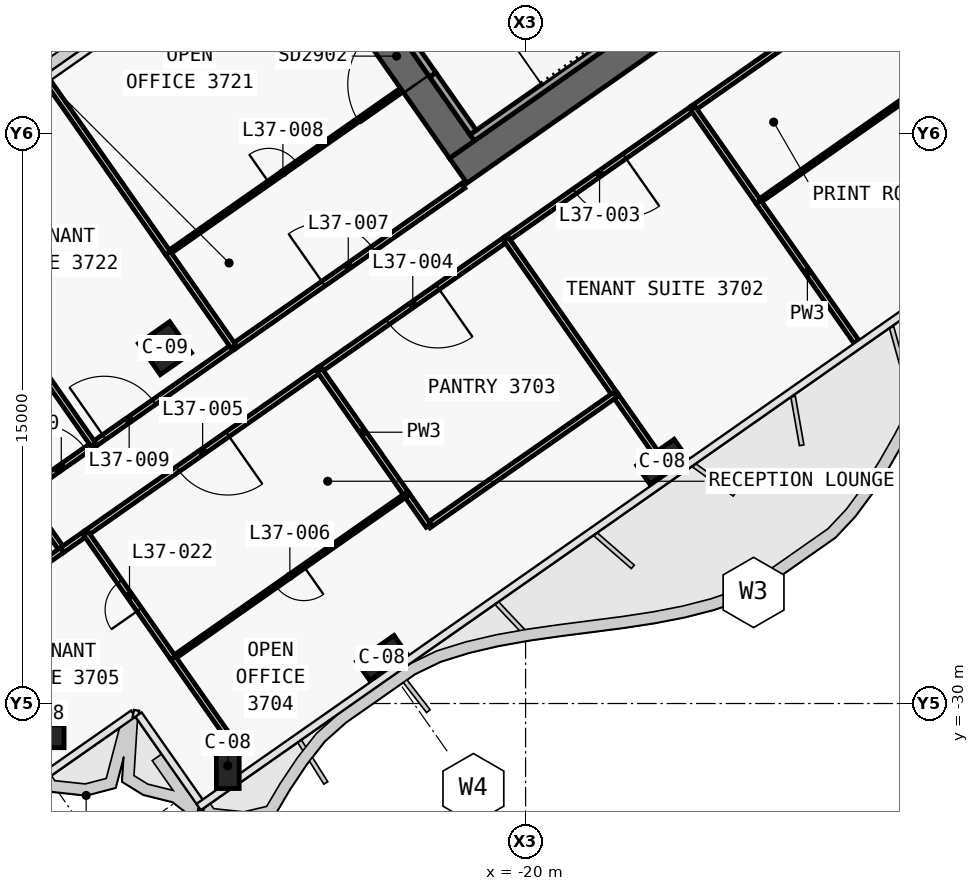
"""IFC4 building model, lengths in metres.
Left out: names, types, materials, properties, quantities, classifications, styles, units other than length and angle.
Written with IfcOpenShell. Run it as: python <this file> out.ifc"""

import sys

from ifc_helpers import new_model, si_unit, direction, frame, frame_2d, origin, origin_2d, place, context, subcontext, project, spatial, polyline, rectangle, outline, extrude, clip, halfspace, element, fill, save


model = new_model("IFC4")
c1 = context("Model", 3, precision=1e-05, world=origin(), true_north=direction((0.0, 1.0)))
c2 = subcontext(c1, "Body", "Model", "MODEL_VIEW")
j1 = project(units=[si_unit("LENGTHUNIT", "METRE"), si_unit("PLANEANGLEUNIT", "RADIAN")], contexts=[c1])
p1 = place(None, origin())
s1 = spatial("IfcSite", under=j1, at=p1, CompositionType="ELEMENT")
p2 = place(p1, origin())
s2 = spatial("IfcBuilding", under=s1, at=p2, CompositionType="ELEMENT")
p3 = place(p2, frame((0.0, 0.0, 163.2)))
s3 = spatial("IfcBuildingStorey", under=s2, at=p3, CompositionType="ELEMENT", Elevation=163.2)
p4 = place(p3, frame((0.029, -0.712, 0.0), z_axis=(0.0, 0.0, 1.0), x_axis=(-0.819151758019, -0.573576845187, 0.0)))
e1 = element("IfcWall", 1, at=p4, inside=s3, PredefinedType="SHEAR", context=c2, shape_type="SweptSolid", body=[
    extrude(outline(polyline([(26.616, 0.4), (0.56, 0.4), (-0.0, -0.4), (26.616, -0.4), (26.616, 0.4)])), origin(), (0.0, 0.0, 1.0), 3.9),
])
p5 = place(p4, frame((2.966, 0.0, 0.0)))
e2 = element("IfcOpeningElement", 2, at=p5, cuts=e1, PredefinedType="OPENING", context=c2, shape_type="SweptSolid", body=[
    extrude(rectangle(XDim=2.4, YDim=2.1, at=frame_2d((1.2, 1.05))), frame((0.0, 0.41, 0.0), z_axis=(0.0, -1.0, 0.0), x_axis=(1.0, 0.0, 0.0)), (0.0, 0.0, 1.0), 0.82),
])
p6 = place(p4, frame((11.916, 0.0, 0.0)))
e3 = element("IfcOpeningElement", 3, at=p6, cuts=e1, PredefinedType="OPENING", context=c2, shape_type="SweptSolid", body=[
    extrude(rectangle(XDim=2.4, YDim=2.1, at=frame_2d((1.2, 1.05))), frame((0.0, 0.41, 0.0), z_axis=(0.0, -1.0, 0.0), x_axis=(1.0, 0.0, 0.0)), (0.0, 0.0, 1.0), 0.82),
])
p7 = place(p3, frame((-21.675, -15.421, 0.0), z_axis=(0.0, 0.0, 1.0), x_axis=(-0.573581815061, 0.819148278049, 0.0)))
e4 = element("IfcWall", 4, at=p7, inside=s3, PredefinedType="SHEAR", context=c2, shape_type="SweptSolid", body=[
    extrude(outline(polyline([(0.0, 0.4), (0.0, -0.4), (9.6, -0.4), (9.6, 0.4), (0.0, 0.4)])), origin(), (0.0, 0.0, 1.0), 3.9),
])
p8 = place(p7, frame((6.3, 0.0, 0.0)))
e5 = element("IfcOpeningElement", 5, at=p8, cuts=e4, PredefinedType="OPENING", context=c2, shape_type="SweptSolid", body=[
    extrude(rectangle(XDim=1.8, YDim=2.1, at=frame_2d((0.9, 1.05))), frame((0.0, 0.41, 0.0), z_axis=(0.0, -1.0, 0.0), x_axis=(1.0, 0.0, 0.0)), (0.0, 0.0, 1.0), 0.82),
])
p9 = place(p7, frame((2.1, 0.0, 0.0)))
e6 = element("IfcOpeningElement", 6, at=p9, cuts=e4, PredefinedType="OPENING", context=c2, shape_type="SweptSolid", body=[
    extrude(rectangle(XDim=1.8, YDim=2.1, at=frame_2d((0.9, 1.05))), frame((0.0, 0.41, 0.0), z_axis=(0.0, -1.0, 0.0), x_axis=(1.0, 0.0, 0.0)), (0.0, 0.0, 1.0), 0.82),
])
for number, where, z_axis, x_axis in (
    (7, (-16.41, -23.637, 0.0), (0.0, 0.0, 1.0), (-0.819, -0.574, 0.0)),
    (8, (-23.782, -28.799, 0.0), (0.0, 0.0, 1.0), (-0.819, -0.574, 0.0)),
):
    element("IfcColumn", number, at=place(p3, frame(where, z_axis=z_axis, x_axis=x_axis)), inside=s3, PredefinedType="COLUMN", context=c2, shape_type="SweptSolid", body=[
        extrude(rectangle(XDim=1.2, YDim=0.6, at=origin_2d()), origin(), (0.0, 0.0, 1.0), 3.9),
    ])
p10 = place(p3, frame((-28.042, -31.782, 0.0), z_axis=(0.477746603964, 0.334466003579, 0.812336552699), x_axis=(-0.665463644855, -0.465884977465, 0.583188927492)))
e9 = element("IfcColumn", 9, at=p10, inside=s3, PredefinedType="COLUMN", context=c2, shape_type="Clipping", body=[
    clip(clip(extrude(rectangle(XDim=1.2, YDim=0.6, at=origin_2d()), origin(), (0.0, 0.0, 1.0), 4.801), halfspace(frame((0.0, 0.0, 0.431), z_axis=(0.0, 0.0, 1.0), x_axis=(1.0, 0.0, 0.0)), True)), halfspace(frame((0.0, 0.0, 4.37), z_axis=(0.0, 0.0, 1.0), x_axis=(1.0, 0.0, 0.0)), False)),
])
p11 = place(p3, frame((-32.847, -30.935, 0.0), z_axis=(0.477704706914, 0.334521785172, 0.812338222809), x_axis=(-0.573610203854, 0.819128398991, 0.0)))
e10 = element("IfcColumn", 10, at=p11, inside=s3, PredefinedType="COLUMN", context=c2, shape_type="Clipping", body=[
    clip(clip(extrude(rectangle(XDim=1.2, YDim=0.6, at=origin_2d()), origin(), (0.0, 0.0, 1.0), 4.801), halfspace(frame((0.0, 0.0, 0.215), z_axis=(0.0, 0.0, 1.0), x_axis=(1.0, 0.0, 0.0)), True)), halfspace(frame((0.0, 0.0, 4.585), z_axis=(0.0, 0.0, 1.0), x_axis=(1.0, 0.0, 0.0)), False)),
])
p12 = place(p3, frame((-29.49, -20.649, 0.0), z_axis=(0.0, 0.0, 1.0), x_axis=(-0.819152044289, -0.573576436351, 0.0)))
e11 = element("IfcColumn", 11, at=p12, inside=s3, PredefinedType="COLUMN", context=c2, shape_type="SweptSolid", body=[
    extrude(rectangle(XDim=1.0, YDim=1.0, at=origin_2d()), origin(), (0.0, 0.0, 1.0), 3.9),
])
p13 = place(p3, frame((-14.851, -10.521, 0.0), z_axis=(0.0, 0.0, 1.0), x_axis=(-0.819141584393, -0.57359137434, 0.0)))
e12 = element("IfcWall", 12, at=p13, inside=s3, PredefinedType="SOLIDWALL", context=c2, shape_type="SweptSolid", body=[
    extrude(rectangle(XDim=8.0, YDim=0.2, at=frame_2d((4.0, 0.0))), origin(), (0.0, 0.0, 1.0), 3.62),
])
p14 = place(p3, frame((-21.38, -14.97, 0.0), z_axis=(0.0, 0.0, 1.0), x_axis=(-0.573559770908, 0.819163713305, 0.0)))
e13 = element("IfcWall", 13, at=p14, inside=s3, PredefinedType="SOLIDWALL", context=c2, shape_type="SweptSolid", body=[
    extrude(rectangle(XDim=1.85, YDim=0.2, at=frame_2d((0.925, 0.0))), origin(), (0.0, 0.0, 1.0), 3.62),
])
p15 = place(p3, frame((-22.441, -13.455, 2.15), z_axis=(0.0, 0.0, 1.0), x_axis=(-0.573591692345, 0.819141361715, 0.0)))
e14 = element("IfcWall", 14, at=p15, inside=s3, PredefinedType="SOLIDWALL", context=c2, shape_type="SweptSolid", body=[
    extrude(rectangle(XDim=1.9, YDim=0.2, at=frame_2d((0.95, 0.0))), origin(), (0.0, 0.0, 1.0), 1.47),
])
p16 = place(p3, frame((-27.689, -20.609, 0.0), z_axis=(0.0, 0.0, 1.0), x_axis=(0.819148008851, 0.573582199511, 0.0)))
e15 = element("IfcWall", 15, at=p16, inside=s3, PredefinedType="PARTITIONING", context=c2, shape_type="SweptSolid", body=[
    extrude(rectangle(XDim=7.382, YDim=0.15, at=frame_2d((3.691, 0.0))), origin(), (0.0, 0.0, 1.0), 3.0),
])
p17 = place(p16, frame((2.891, 0.0, 0.0)))
e16 = element("IfcOpeningElement", 16, at=p17, cuts=e15, PredefinedType="OPENING", context=c2, shape_type="SweptSolid", body=[
    extrude(rectangle(XDim=1.6, YDim=2.1, at=frame_2d((0.8, 1.05))), frame((0.0, 0.085, 0.0), z_axis=(0.0, -1.0, 0.0), x_axis=(1.0, 0.0, 0.0)), (0.0, 0.0, 1.0), 0.17),
])
p18 = place(p3, frame((-31.375, -23.19, 0.0), z_axis=(0.0, 0.0, 1.0), x_axis=(0.819165703328, 0.573556928727, 0.0)))
e17 = element("IfcWall", 17, at=p18, inside=s3, PredefinedType="PARTITIONING", context=c2, shape_type="SweptSolid", body=[
    extrude(rectangle(XDim=4.504, YDim=0.15, at=frame_2d((2.252, 0.0))), origin(), (0.0, 0.0, 1.0), 3.0),
])
p19 = place(p18, frame((0.352, 0.0, 0.0)))
e18 = element("IfcOpeningElement", 18, at=p19, cuts=e17, PredefinedType="OPENING", context=c2, shape_type="SweptSolid", body=[
    extrude(rectangle(XDim=1.6, YDim=2.1, at=frame_2d((0.8, 1.05))), frame((0.0, 0.085, 0.0), z_axis=(0.0, -1.0, 0.0), x_axis=(1.0, 0.0, 0.0)), (0.0, 0.0, 1.0), 0.17),
])
p20 = place(p3, frame((-32.194, -25.961, 0.0), z_axis=(0.0, 0.0, 1.0), x_axis=(-0.573553363558, 0.819168199548, 0.0)))
e19 = element("IfcWall", 19, at=p20, inside=s3, PredefinedType="PARTITIONING", context=c2, shape_type="SweptSolid", body=[
    extrude(rectangle(XDim=1.8, YDim=0.15, at=frame_2d((0.9, 0.0))), origin(), (0.0, 0.0, 1.0), 3.0),
])
p21 = place(p3, frame((-33.226, -24.486, 0.0), z_axis=(0.0, 0.0, 1.0), x_axis=(0.819176192989, 0.573541946888, 0.0)))
e20 = element("IfcWall", 20, at=p21, inside=s3, PredefinedType="PARTITIONING", context=c2, shape_type="SweptSolid", body=[
    extrude(rectangle(XDim=2.264, YDim=0.15, at=frame_2d((1.132, 0.0))), origin(), (0.0, 0.0, 1.0), 3.0),
])
p22 = place(p21, frame((0.432, 0.0, 0.0)))
e21 = element("IfcOpeningElement", 21, at=p22, cuts=e20, PredefinedType="OPENING", context=c2, shape_type="SweptSolid", body=[
    extrude(rectangle(XDim=1.6, YDim=2.1, at=frame_2d((0.8, 1.05))), frame((0.0, 0.085, 0.0), z_axis=(0.0, -1.0, 0.0), x_axis=(1.0, 0.0, 0.0)), (0.0, 0.0, 1.0), 0.17),
])
p23 = place(p3, frame((-5.766, -7.456, 0.0), z_axis=(0.0, 0.0, 1.0), x_axis=(-0.81915546166, -0.573571555809, 0.0)))
e22 = element("IfcWall", 22, at=p23, inside=s3, PredefinedType="PARTITIONING", context=c2, shape_type="SweptSolid", body=[
    extrude(rectangle(XDim=12.002, YDim=0.15, at=frame_2d((6.001, 0.0))), origin(), (0.0, 0.0, 1.0), 3.0),
])
p24 = place(p23, frame((5.201, 0.0, 0.0)))
e23 = element("IfcOpeningElement", 23, at=p24, cuts=e22, PredefinedType="OPENING", context=c2, shape_type="SweptSolid", body=[
    extrude(rectangle(XDim=1.6, YDim=2.1, at=frame_2d((0.8, 1.05))), frame((0.0, 0.085, 0.0), z_axis=(0.0, -1.0, 0.0), x_axis=(1.0, 0.0, 0.0)), (0.0, 0.0, 1.0), 0.17),
])
p25 = place(p3, frame((-15.594, -14.338, 0.0), z_axis=(0.0, 0.0, 1.0), x_axis=(-0.819165052243, -0.573557858619, 0.0)))
e24 = element("IfcWall", 24, at=p25, inside=s3, PredefinedType="PARTITIONING", context=c2, shape_type="SweptSolid", body=[
    extrude(rectangle(XDim=6.004, YDim=0.15, at=frame_2d((3.002, 0.0))), origin(), (0.0, 0.0, 1.0), 3.0),
])
p26 = place(p25, frame((2.202, 0.0, 0.0)))
e25 = element("IfcOpeningElement", 25, at=p26, cuts=e24, PredefinedType="OPENING", context=c2, shape_type="SweptSolid", body=[
    extrude(rectangle(XDim=1.6, YDim=2.1, at=frame_2d((0.8, 1.05))), frame((0.0, 0.085, 0.0), z_axis=(0.0, -1.0, 0.0), x_axis=(1.0, 0.0, 0.0)), (0.0, 0.0, 1.0), 0.17),
])
p27 = place(p3, frame((-20.51, -17.779, 0.0), z_axis=(0.0, 0.0, 1.0), x_axis=(-0.819132568355, -0.573604249862, 0.0)))
e26 = element("IfcWall", 26, at=p27, inside=s3, PredefinedType="PARTITIONING", context=c2, shape_type="SweptSolid", body=[
    extrude(rectangle(XDim=6.004, YDim=0.15, at=frame_2d((3.002, 0.0))), origin(), (0.0, 0.0, 1.0), 3.0),
])
p28 = place(p27, frame((2.202, 0.0, 0.0)))
e27 = element("IfcOpeningElement", 27, at=p28, cuts=e26, PredefinedType="OPENING", context=c2, shape_type="SweptSolid", body=[
    extrude(rectangle(XDim=1.6, YDim=2.1, at=frame_2d((0.8, 1.05))), frame((0.0, 0.085, 0.0), z_axis=(0.0, -1.0, 0.0), x_axis=(1.0, 0.0, 0.0)), (0.0, 0.0, 1.0), 0.17),
])
p29 = place(p3, frame((-25.424, -21.22, 0.0), z_axis=(0.0, 0.0, 1.0), x_axis=(-0.819149375276, -0.573580248078, 0.0)))
e28 = element("IfcWall", 28, at=p29, inside=s3, PredefinedType="PARTITIONING", context=c2, shape_type="SweptSolid", body=[
    extrude(rectangle(XDim=7.504, YDim=0.15, at=frame_2d((3.752, 0.0))), origin(), (0.0, 0.0, 1.0), 3.0),
])
p30 = place(p29, frame((2.952, 0.0, 0.0)))
e29 = element("IfcOpeningElement", 29, at=p30, cuts=e28, PredefinedType="OPENING", context=c2, shape_type="SweptSolid", body=[
    extrude(rectangle(XDim=1.6, YDim=2.1, at=frame_2d((0.8, 1.05))), frame((0.0, 0.085, 0.0), z_axis=(0.0, -1.0, 0.0), x_axis=(1.0, 0.0, 0.0)), (0.0, 0.0, 1.0), 0.17),
])
p31 = place(p3, frame((-31.568, -25.522, 0.0), z_axis=(0.0, 0.0, 1.0), x_axis=(-0.818946604201, -0.573869723428, 0.0)))
e30 = element("IfcWall", 30, at=p31, inside=s3, PredefinedType="PARTITIONING", context=c2, shape_type="SweptSolid", body=[
    extrude(rectangle(XDim=0.764, YDim=0.15, at=frame_2d((0.382, 0.0))), origin(), (0.0, 0.0, 1.0), 3.62),
])
p32 = place(p3, frame((-29.408, -18.149, 0.0), z_axis=(0.0, 0.0, 1.0), x_axis=(0.819144879919, 0.573586667996, 0.0)))
e31 = element("IfcWall", 31, at=p32, inside=s3, PredefinedType="PARTITIONING", context=c2, shape_type="SweptSolid", body=[
    extrude(rectangle(XDim=7.38, YDim=0.1, at=frame_2d((3.69, 0.0))), origin(), (0.0, 0.0, 1.0), 3.62),
])
p33 = place(p32, frame((3.24, 0.0, 0.0)))
e32 = element("IfcOpeningElement", 32, at=p33, cuts=e31, PredefinedType="OPENING", context=c2, shape_type="SweptSolid", body=[
    extrude(rectangle(XDim=0.9, YDim=2.1, at=frame_2d((0.45, 1.05))), frame((0.0, 0.06, 0.0), z_axis=(0.0, -1.0, 0.0), x_axis=(1.0, 0.0, 0.0)), (0.0, 0.0, 1.0), 0.12),
])
p34 = place(p3, frame((-29.408, -18.149, 0.0), z_axis=(0.0, 0.0, 1.0), x_axis=(-0.573560668443, 0.819163084871, 0.0)))
e33 = element("IfcWall", 33, at=p34, inside=s3, PredefinedType="PARTITIONING", context=c2, shape_type="SweptSolid", body=[
    extrude(rectangle(XDim=5.499, YDim=0.15, at=frame_2d((2.75, 0.0))), origin(), (0.0, 0.0, 1.0), 3.0),
])
p35 = place(p3, frame((-27.687, -20.607, 0.0), z_axis=(0.0, 0.0, 1.0), x_axis=(-0.573598887793, 0.819136323161, 0.0)))
e34 = element("IfcWall", 34, at=p35, inside=s3, PredefinedType="PARTITIONING", context=c2, shape_type="SweptSolid", body=[
    extrude(rectangle(XDim=3.0, YDim=0.15, at=frame_2d((1.5, 0.0))), origin(), (0.0, 0.0, 1.0), 3.0),
])
p36 = place(p3, frame((-31.373, -23.189, 0.0), z_axis=(0.0, 0.0, 1.0), x_axis=(-0.573602698703, 0.819133654565, 0.0)))
e35 = element("IfcWall", 35, at=p36, inside=s3, PredefinedType="PARTITIONING", context=c2, shape_type="SweptSolid", body=[
    extrude(rectangle(XDim=3.502, YDim=0.15, at=frame_2d((1.751, 0.0))), origin(), (0.0, 0.0, 1.0), 3.0),
])
p37 = place(p3, frame((-32.194, -25.961, 0.0), z_axis=(0.0, 0.0, 1.0), x_axis=(-0.819139845177, -0.573593858094, 0.0)))
e36 = element("IfcWall", 36, at=p37, inside=s3, PredefinedType="PARTITIONING", context=c2, shape_type="SweptSolid", body=[
    extrude(rectangle(XDim=3.738, YDim=0.15, at=frame_2d((1.869, 0.0))), origin(), (0.0, 0.0, 1.0), 2.9),
])
p38 = place(p3, frame((-4.045, -9.914, 0.0), z_axis=(0.0, 0.0, 1.0), x_axis=(-0.819146845232, -0.573583861302, 0.0)))
e37 = element("IfcWall", 37, at=p38, inside=s3, PredefinedType="PARTITIONING", context=c2, shape_type="SweptSolid", body=[
    extrude(rectangle(XDim=12.0, YDim=0.1, at=frame_2d((6.0, 0.0))), origin(), (0.0, 0.0, 1.0), 3.0),
])
p39 = place(p38, frame((5.55, 0.0, 0.0)))
e38 = element("IfcOpeningElement", 38, at=p39, cuts=e37, PredefinedType="OPENING", context=c2, shape_type="SweptSolid", body=[
    extrude(rectangle(XDim=0.9, YDim=2.1, at=frame_2d((0.45, 1.05))), frame((0.0, 0.06, 0.0), z_axis=(0.0, -1.0, 0.0), x_axis=(1.0, 0.0, 0.0)), (0.0, 0.0, 1.0), 0.12),
])
p40 = place(p3, frame((-11.294, -20.482, 0.0), z_axis=(0.0, 0.0, 1.0), x_axis=(-0.573589807488, 0.819142681555, 0.0)))
e39 = element("IfcWall", 39, at=p40, inside=s3, PredefinedType="PARTITIONING", context=c2, shape_type="SweptSolid", body=[
    extrude(rectangle(XDim=4.499, YDim=0.15, at=frame_2d((2.25, 0.0))), origin(), (0.0, 0.0, 1.0), 2.9),
])
p41 = place(p3, frame((-13.875, -16.796, 0.0), z_axis=(0.0, 0.0, 1.0), x_axis=(-0.573560650686, 0.819163097304, 0.0)))
e40 = element("IfcWall", 40, at=p41, inside=s3, PredefinedType="PARTITIONING", context=c2, shape_type="SweptSolid", body=[
    extrude(rectangle(XDim=3.0, YDim=0.15, at=frame_2d((1.5, 0.0))), origin(), (0.0, 0.0, 1.0), 3.62),
])
p42 = place(p3, frame((-17.642, -21.878, 0.0), z_axis=(0.0, 0.0, 1.0), x_axis=(-0.573557338351, 0.819165416521, 0.0)))
e41 = element("IfcWall", 41, at=p42, inside=s3, PredefinedType="PARTITIONING", context=c2, shape_type="SweptSolid", body=[
    extrude(rectangle(XDim=5.002, YDim=0.15, at=frame_2d((2.501, 0.0))), origin(), (0.0, 0.0, 1.0), 3.0),
])
p43 = place(p3, frame((-16.594, -23.375, 0.0), z_axis=(0.0, 0.0, 1.0), x_axis=(-0.573569716318, 0.819156749665, 0.0)))
e42 = element("IfcWall", 42, at=p43, inside=s3, PredefinedType="PARTITIONING", context=c2, shape_type="SweptSolid", body=[
    extrude(rectangle(XDim=1.831, YDim=0.15, at=frame_2d((0.916, 0.0))), origin(), (0.0, 0.0, 1.0), 3.0),
])
p44 = place(p3, frame((-17.643, -21.876, 0.0), z_axis=(0.0, 0.0, 1.0), x_axis=(-0.819149710902, -0.573579768758, 0.0)))
e43 = element("IfcWall", 43, at=p44, inside=s3, PredefinedType="PARTITIONING", context=c2, shape_type="SweptSolid", body=[
    extrude(rectangle(XDim=6.0, YDim=0.15, at=frame_2d((3.0, 0.0))), origin(), (0.0, 0.0, 1.0), 3.0),
])
p45 = place(p3, frame((-22.558, -25.317, 0.0), z_axis=(0.0, 0.0, 1.0), x_axis=(-0.573576907489, 0.819151714394, 0.0)))
e44 = element("IfcWall", 44, at=p45, inside=s3, PredefinedType="PARTITIONING", context=c2, shape_type="SweptSolid", body=[
    extrude(rectangle(XDim=1.001, YDim=0.15, at=frame_2d((0.5, 0.0))), origin(), (0.0, 0.0, 1.0), 3.62),
])
p46 = place(p3, frame((-23.131, -24.5, 0.0), z_axis=(0.0, 0.0, 1.0), x_axis=(-0.573560601885, 0.819163131473, 0.0)))
e45 = element("IfcWall", 45, at=p46, inside=s3, PredefinedType="PARTITIONING", context=c2, shape_type="SweptSolid", body=[
    extrude(rectangle(XDim=4.002, YDim=0.15, at=frame_2d((2.001, 0.0))), origin(), (0.0, 0.0, 1.0), 3.62),
])
p47 = place(p3, frame((-23.131, -24.499, 0.0), z_axis=(0.0, 0.0, 1.0), x_axis=(-0.819163097304, -0.573560650686, 0.0)))
e46 = element("IfcWall", 46, at=p47, inside=s3, PredefinedType="PARTITIONING", context=c2, shape_type="SweptSolid", body=[
    extrude(rectangle(XDim=7.5, YDim=0.1, at=frame_2d((3.75, 0.0))), origin(), (0.0, 0.0, 1.0), 3.0),
])
p48 = place(p47, frame((3.3, 0.0, 0.0)))
e47 = element("IfcOpeningElement", 47, at=p48, cuts=e46, PredefinedType="OPENING", context=c2, shape_type="SweptSolid", body=[
    extrude(rectangle(XDim=0.9, YDim=2.1, at=frame_2d((0.45, 1.05))), frame((0.0, 0.06, 0.0), z_axis=(0.0, -1.0, 0.0), x_axis=(1.0, 0.0, 0.0)), (0.0, 0.0, 1.0), 0.12),
])
p49 = place(p3, frame((-27.861, -30.821, 0.0), z_axis=(0.0, 0.0, 1.0), x_axis=(-0.573588597125, 0.819143529089, 0.0)))
e48 = element("IfcWall", 48, at=p49, inside=s3, PredefinedType="PARTITIONING", context=c2, shape_type="SweptSolid", body=[
    extrude(rectangle(XDim=2.466, YDim=0.15, at=frame_2d((1.233, 0.0))), origin(), (0.0, 0.0, 1.0), 2.9),
])
p50 = place(p3, frame((-29.275, -28.8, 0.0), z_axis=(0.0, 0.0, 1.0), x_axis=(-0.573556557423, 0.819165963305, 0.0)))
e49 = element("IfcWall", 49, at=p50, inside=s3, PredefinedType="PARTITIONING", context=c2, shape_type="SweptSolid", body=[
    extrude(rectangle(XDim=4.0, YDim=0.15, at=frame_2d((2.0, 0.0))), origin(), (0.0, 0.0, 1.0), 3.62),
])
p51 = place(p50, frame((1.55, 0.0, 0.0)))
e50 = element("IfcOpeningElement", 50, at=p51, cuts=e49, PredefinedType="OPENING", context=c2, shape_type="SweptSolid", body=[
    extrude(rectangle(XDim=0.9, YDim=2.1, at=frame_2d((0.45, 1.05))), frame((0.0, 0.085, 0.0), z_axis=(0.0, -1.0, 0.0), x_axis=(1.0, 0.0, 0.0)), (0.0, 0.0, 1.0), 0.17),
])
p52 = place(p9, origin())
e51 = element("IfcDoor", 51, at=p52, inside=s3, OperationType="DOUBLE_DOOR_SINGLE_SWING", PredefinedType="DOOR", context=c2, shape_type="SweptSolid", body=[
    extrude(rectangle(XDim=1.8, YDim=2.1, at=frame_2d((0.9, 1.05))), frame((0.0, 0.025, 0.0), z_axis=(0.0, -1.0, 0.0), x_axis=(1.0, 0.0, 0.0)), (0.0, 0.0, 1.0), 0.05),
])
fill(e6, e51)
p53 = place(p26, origin())
e52 = element("IfcDoor", 52, at=p53, inside=s3, OperationType="DOUBLE_DOOR_SINGLE_SWING", PredefinedType="DOOR", context=c2, shape_type="SweptSolid", body=[
    extrude(rectangle(XDim=1.6, YDim=2.1, at=frame_2d((0.8, 1.05))), frame((0.0, 0.025, 0.0), z_axis=(0.0, -1.0, 0.0), x_axis=(1.0, 0.0, 0.0)), (0.0, 0.0, 1.0), 0.05),
])
fill(e25, e52)
p54 = place(p28, origin())
e53 = element("IfcDoor", 53, at=p54, inside=s3, OperationType="DOUBLE_DOOR_SINGLE_SWING", PredefinedType="DOOR", context=c2, shape_type="SweptSolid", body=[
    extrude(rectangle(XDim=1.6, YDim=2.1, at=frame_2d((0.8, 1.05))), frame((0.0, 0.025, 0.0), z_axis=(0.0, -1.0, 0.0), x_axis=(1.0, 0.0, 0.0)), (0.0, 0.0, 1.0), 0.05),
])
fill(e27, e53)
p55 = place(p30, origin())
e54 = element("IfcDoor", 54, at=p55, inside=s3, OperationType="DOUBLE_DOOR_SINGLE_SWING", PredefinedType="DOOR", context=c2, shape_type="SweptSolid", body=[
    extrude(rectangle(XDim=1.6, YDim=2.1, at=frame_2d((0.8, 1.05))), frame((0.0, 0.025, 0.0), z_axis=(0.0, -1.0, 0.0), x_axis=(1.0, 0.0, 0.0)), (0.0, 0.0, 1.0), 0.05),
])
fill(e29, e54)
p56 = place(p48, origin())
e55 = element("IfcDoor", 55, at=p56, inside=s3, OperationType="SINGLE_SWING_RIGHT", PredefinedType="DOOR", context=c2, shape_type="SweptSolid", body=[
    extrude(rectangle(XDim=0.9, YDim=2.1, at=frame_2d((0.45, 1.05))), frame((0.0, 0.025, 0.0), z_axis=(0.0, -1.0, 0.0), x_axis=(1.0, 0.0, 0.0)), (0.0, 0.0, 1.0), 0.05),
])
fill(e47, e55)
p57 = place(p17, origin())
e56 = element("IfcDoor", 56, at=p57, inside=s3, OperationType="DOUBLE_DOOR_SINGLE_SWING", PredefinedType="DOOR", context=c2, shape_type="SweptSolid", body=[
    extrude(rectangle(XDim=1.6, YDim=2.1, at=frame_2d((0.8, 1.05))), frame((0.0, 0.025, 0.0), z_axis=(0.0, -1.0, 0.0), x_axis=(1.0, 0.0, 0.0)), (0.0, 0.0, 1.0), 0.05),
])
fill(e16, e56)
p58 = place(p33, origin())
e57 = element("IfcDoor", 57, at=p58, inside=s3, OperationType="SINGLE_SWING_LEFT", PredefinedType="DOOR", context=c2, shape_type="SweptSolid", body=[
    extrude(rectangle(XDim=0.9, YDim=2.1, at=frame_2d((0.45, 1.05))), frame((0.0, 0.025, 0.0), z_axis=(0.0, -1.0, 0.0), x_axis=(1.0, 0.0, 0.0)), (0.0, 0.0, 1.0), 0.05),
])
fill(e32, e57)
p59 = place(p19, origin())
e58 = element("IfcDoor", 58, at=p59, inside=s3, OperationType="DOUBLE_DOOR_SINGLE_SWING", PredefinedType="DOOR", context=c2, shape_type="SweptSolid", body=[
    extrude(rectangle(XDim=1.6, YDim=2.1, at=frame_2d((0.8, 1.05))), frame((0.0, 0.025, 0.0), z_axis=(0.0, -1.0, 0.0), x_axis=(1.0, 0.0, 0.0)), (0.0, 0.0, 1.0), 0.05),
])
fill(e18, e58)
p60 = place(p22, origin())
e59 = element("IfcDoor", 59, at=p60, inside=s3, OperationType="DOUBLE_DOOR_SINGLE_SWING", PredefinedType="DOOR", context=c2, shape_type="SweptSolid", body=[
    extrude(rectangle(XDim=1.6, YDim=2.1, at=frame_2d((0.8, 1.05))), frame((0.0, 0.025, 0.0), z_axis=(0.0, -1.0, 0.0), x_axis=(1.0, 0.0, 0.0)), (0.0, 0.0, 1.0), 0.05),
])
fill(e21, e59)
p61 = place(p51, origin())
e60 = element("IfcDoor", 60, at=p61, inside=s3, OperationType="SINGLE_SWING_RIGHT", PredefinedType="DOOR", context=c2, shape_type="SweptSolid", body=[
    extrude(rectangle(XDim=0.9, YDim=2.1, at=frame_2d((0.45, 1.05))), frame((0.0, 0.025, 0.0), z_axis=(0.0, -1.0, 0.0), x_axis=(1.0, 0.0, 0.0)), (0.0, 0.0, 1.0), 0.05),
])
fill(e50, e60)
save(model, sys.argv[1])
